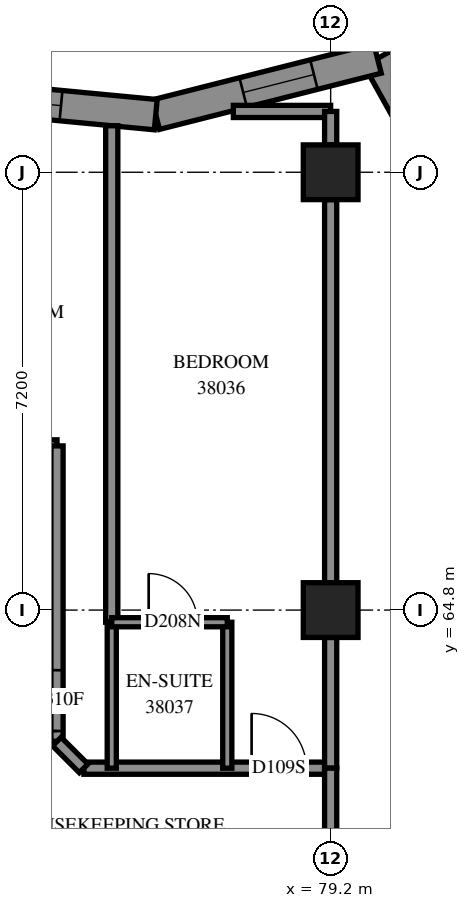
"""IFC4 building model, lengths in metres.
Left out: names, types, materials, properties, quantities, classifications, styles, units other than length and angle.
Written with IfcOpenShell. Run it as: python <this file> out.ifc"""

import sys

from ifc_helpers import new_model, si_unit, direction, frame, frame_2d, origin, origin_2d, place, context, subcontext, project, spatial, polyline, rectangle, outline, extrude, element, fill, save


model = new_model("IFC4")
c1 = context("Model", 3, precision=1e-05, world=origin(), true_north=direction((0.0, 1.0)))
c2 = subcontext(c1, "Body", "Model", "MODEL_VIEW")
j1 = project(units=[si_unit("LENGTHUNIT", "METRE"), si_unit("PLANEANGLEUNIT", "RADIAN")], contexts=[c1])
p1 = place(None, origin())
s1 = spatial("IfcSite", under=j1, at=p1, CompositionType="ELEMENT")
p2 = place(p1, origin())
s2 = spatial("IfcBuilding", under=s1, at=p2, CompositionType="ELEMENT")
p3 = place(p2, frame((0.0, 0.0, 142.2)))
s3 = spatial("IfcBuildingStorey", under=s2, at=p3, CompositionType="ELEMENT", Elevation=142.2)
for number, where, z_axis, x_axis in (
    (1, (79.2, 64.8, 0.0), (0.0, 0.0, 1.0), (1.0, 0.0, 0.0)),
    (2, (79.2, 72.0, 0.0), (0.0, 0.0, 1.0), (1.0, 0.0, 0.0)),
):
    element("IfcColumn", number, at=place(p3, frame(where, z_axis=z_axis, x_axis=x_axis)), inside=s3, PredefinedType="COLUMN", context=c2, shape_type="SweptSolid", body=[
        extrude(rectangle(XDim=0.9, YDim=0.9, at=origin_2d()), origin(), (0.0, 0.0, 1.0), 3.1),
    ])
p4 = place(p3, frame((81.607, 70.931, 0.0), z_axis=(0.0, 0.0, 1.0), x_axis=(-0.4864047305, 0.8737336197, 0.0)))
e3 = element("IfcWall", 3, at=p4, inside=s3, PredefinedType="SOLIDWALL", context=c2, shape_type="SweptSolid", body=[
    extrude(outline(polyline([(0.049, -0.25), (3.557, -0.25), (3.173, 0.25), (-0.049, 0.25), (0.049, -0.25)])), origin(), (0.0, 0.0, 1.0), 3.1),
])
p5 = place(p4, frame((0.778, 0.0, 0.45)))
e4 = element("IfcOpeningElement", 4, at=p5, cuts=e3, PredefinedType="OPENING", context=c2, shape_type="SweptSolid", body=[
    extrude(rectangle(XDim=1.2, YDim=2.5, at=frame_2d((0.6, 1.25))), frame((0.0, 0.26, 0.0), z_axis=(0.0, -1.0, 0.0), x_axis=(1.0, 0.0, 0.0)), (0.0, 0.0, 1.0), 0.52),
])
p6 = place(p3, frame((79.97, 73.871, 0.0), z_axis=(0.0, 0.0, 1.0), x_axis=(-0.9693397955, -0.2457241559, 0.0)))
e5 = element("IfcWall", 5, at=p6, inside=s3, PredefinedType="SOLIDWALL", context=c2, shape_type="SweptSolid", body=[
    extrude(outline(polyline([(-0.192, -0.25), (3.719, -0.25), (3.805, 0.25), (0.192, 0.25), (-0.192, -0.25)])), origin(), (0.0, 0.0, 1.0), 3.1),
])
p7 = place(p6, frame((1.078, 0.0, 0.45)))
e6 = element("IfcOpeningElement", 6, at=p7, cuts=e5, PredefinedType="OPENING", context=c2, shape_type="SweptSolid", body=[
    extrude(rectangle(XDim=1.2, YDim=2.5, at=frame_2d((0.6, 1.25))), frame((0.0, 0.26, 0.0), z_axis=(0.0, -1.0, 0.0), x_axis=(1.0, 0.0, 0.0)), (0.0, 0.0, 1.0), 0.52),
])
p8 = place(p3, frame((76.324, 72.947, 0.0), z_axis=(0.0, 0.0, 1.0), x_axis=(-0.99549559, 0.0948078598, 0.0)))
e7 = element("IfcWall", 7, at=p8, inside=s3, PredefinedType="SOLIDWALL", context=c2, shape_type="SweptSolid", body=[
    extrude(outline(polyline([(0.043, -0.25), (3.852, -0.25), (3.804, 0.25), (-0.043, 0.25), (0.043, -0.25)])), origin(), (0.0, 0.0, 1.0), 3.1),
])
p9 = place(p8, frame((1.565, 0.0, 0.45)))
e8 = element("IfcOpeningElement", 8, at=p9, cuts=e7, PredefinedType="OPENING", context=c2, shape_type="SweptSolid", body=[
    extrude(rectangle(XDim=1.2, YDim=2.5, at=frame_2d((0.6, 1.25))), frame((0.0, 0.26, 0.0), z_axis=(0.0, -1.0, 0.0), x_axis=(1.0, 0.0, 0.0)), (0.0, 0.0, 1.0), 0.52),
])
p10 = place(p3, frame((54.9, 67.5, 0.0), z_axis=(0.0, 0.0, 1.0), x_axis=(1.0, 0.0, 0.0)))
e9 = element("IfcWall", 9, at=p10, inside=s3, PredefinedType="PARTITIONING", context=c2, shape_type="SweptSolid", body=[
    extrude(rectangle(XDim=19.8, YDim=0.2, at=frame_2d((9.9, 0.0))), origin(), (0.0, 0.0, 1.0), 3.1),
])
p11 = place(p10, frame((6.586, 0.0, 0.0)))
e10 = element("IfcOpeningElement", 10, at=p11, cuts=e9, PredefinedType="OPENING", context=c2, shape_type="SweptSolid", body=[
    extrude(rectangle(XDim=1.0, YDim=2.1, at=frame_2d((0.5, 1.05))), frame((0.0, 0.11, 0.0), z_axis=(0.0, -1.0, 0.0), x_axis=(1.0, 0.0, 0.0)), (0.0, 0.0, 1.0), 0.22),
])
p12 = place(p10, frame((14.089, 0.0, 0.0)))
e11 = element("IfcOpeningElement", 11, at=p12, cuts=e9, PredefinedType="OPENING", context=c2, shape_type="SweptSolid", body=[
    extrude(rectangle(XDim=1.0, YDim=2.1, at=frame_2d((0.5, 1.05))), frame((0.0, 0.11, 0.0), z_axis=(0.0, -1.0, 0.0), x_axis=(1.0, 0.0, 0.0)), (0.0, 0.0, 1.0), 0.22),
])
p13 = place(p3, frame((75.6, 64.6, 0.0), z_axis=(0.0, 0.0, 1.0), x_axis=(0.0, 1.0, 0.0)))
e12 = element("IfcWall", 12, at=p13, inside=s3, PredefinedType="PARTITIONING", context=c2, shape_type="SweptSolid", body=[
    extrude(rectangle(XDim=8.165, YDim=0.2, at=frame_2d((4.082, 0.0))), origin(), (0.0, 0.0, 1.0), 3.1),
])
p14 = place(p3, frame((79.2, 65.25, 0.0), z_axis=(0.0, 0.0, 1.0), x_axis=(0.0, 1.0, 0.0)))
e13 = element("IfcWall", 13, at=p14, inside=s3, PredefinedType="PARTITIONING", context=c2, shape_type="SweptSolid", body=[
    extrude(rectangle(XDim=6.3, YDim=0.2, at=frame_2d((3.15, 0.0))), origin(), (0.0, 0.0, 1.0), 3.1),
])
p15 = place(p3, frame((74.7, 62.642, 0.0), z_axis=(0.0, 0.0, 1.0), x_axis=(0.0, 1.0, 0.0)))
e14 = element("IfcWall", 14, at=p15, inside=s3, PredefinedType="PARTITIONING", context=c2, shape_type="SweptSolid", body=[
    extrude(rectangle(XDim=4.858, YDim=0.2, at=frame_2d((2.429, 0.0))), origin(), (0.0, 0.0, 1.0), 3.1),
])
p16 = place(p15, frame((0.169, 0.0, 0.0)))
e15 = element("IfcOpeningElement", 15, at=p16, cuts=e14, PredefinedType="OPENING", context=c2, shape_type="SweptSolid", body=[
    extrude(rectangle(XDim=1.0, YDim=2.1, at=frame_2d((0.5, 1.05))), frame((0.0, 0.11, 0.0), z_axis=(0.0, -1.0, 0.0), x_axis=(1.0, 0.0, 0.0)), (0.0, 0.0, 1.0), 0.22),
])
p17 = place(p3, frame((75.142, 62.2, 0.0), z_axis=(0.0, 0.0, 1.0), x_axis=(1.0, 0.0, 0.0)))
e16 = element("IfcWall", 16, at=p17, inside=s3, PredefinedType="PARTITIONING", context=c2, shape_type="SweptSolid", body=[
    extrude(rectangle(XDim=4.058, YDim=0.2, at=frame_2d((2.029, 0.0))), origin(), (0.0, 0.0, 1.0), 3.1),
])
p18 = place(p17, frame((2.758, 0.0, 0.0)))
e17 = element("IfcOpeningElement", 17, at=p18, cuts=e16, PredefinedType="OPENING", context=c2, shape_type="SweptSolid", body=[
    extrude(rectangle(XDim=0.9, YDim=2.1, at=frame_2d((0.45, 1.05))), frame((0.0, 0.11, 0.0), z_axis=(0.0, -1.0, 0.0), x_axis=(1.0, 0.0, 0.0)), (0.0, 0.0, 1.0), 0.22),
])
for number, where, z_axis, x_axis in (
    (18, (75.6, 62.2, 0.0), (0.0, 0.0, 1.0), (0.0, 1.0, 0.0)),
    (19, (77.5, 62.2, 0.0), (0.0, 0.0, 1.0), (0.0, 1.0, 0.0)),
):
    element("IfcWall", number, at=place(p3, frame(where, z_axis=z_axis, x_axis=x_axis)), inside=s3, PredefinedType="PARTITIONING", context=c2, shape_type="SweptSolid", body=[
        extrude(rectangle(XDim=2.4, YDim=0.15, at=frame_2d((1.2, 0.0))), origin(), (0.0, 0.0, 1.0), 3.1),
    ])
p19 = place(p3, frame((79.2, 62.2, 0.0), z_axis=(0.0, 0.0, 1.0), x_axis=(0.0, 1.0, 0.0)))
e20 = element("IfcWall", 20, at=p19, inside=s3, PredefinedType="PARTITIONING", context=c2, shape_type="SweptSolid", body=[
    extrude(rectangle(XDim=2.15, YDim=0.2, at=frame_2d((1.075, 0.0))), origin(), (0.0, 0.0, 1.0), 3.1),
])
p20 = place(p3, frame((79.2, 60.2, 0.0), z_axis=(0.0, 0.0, 1.0), x_axis=(0.0, 1.0, 0.0)))
e21 = element("IfcWall", 21, at=p20, inside=s3, PredefinedType="PARTITIONING", context=c2, shape_type="SweptSolid", body=[
    extrude(rectangle(XDim=2.0, YDim=0.2, at=frame_2d((1.0, 0.0))), origin(), (0.0, 0.0, 1.0), 3.1),
])
p21 = place(p3, frame((75.6, 64.6, 0.0), z_axis=(0.0, 0.0, 1.0), x_axis=(1.0, 0.0, 0.0)))
e22 = element("IfcWall", 22, at=p21, inside=s3, PredefinedType="PARTITIONING", context=c2, shape_type="SweptSolid", body=[
    extrude(rectangle(XDim=1.9, YDim=0.15, at=frame_2d((0.95, 0.0))), origin(), (0.0, 0.0, 1.0), 3.1),
])
p22 = place(p21, frame((0.607, 0.0, 0.0)))
e23 = element("IfcOpeningElement", 23, at=p22, cuts=e22, PredefinedType="OPENING", context=c2, shape_type="SweptSolid", body=[
    extrude(rectangle(XDim=0.8, YDim=2.1, at=frame_2d((0.4, 1.05))), frame((0.0, 0.085, 0.0), z_axis=(0.0, -1.0, 0.0), x_axis=(1.0, 0.0, 0.0)), (0.0, 0.0, 1.0), 0.17),
])
p23 = place(p3, frame((77.6, 73.0, 0.0), z_axis=(0.0, 0.0, 1.0), x_axis=(1.0, 0.0, 0.0)))
e24 = element("IfcWall", 24, at=p23, inside=s3, PredefinedType="PARTITIONING", context=c2, shape_type="SweptSolid", body=[
    extrude(rectangle(XDim=1.6, YDim=0.2, at=frame_2d((0.8, 0.0))), origin(), (0.0, 0.0, 1.0), 3.1),
])
p24 = place(p3, frame((74.697, 62.637, 0.0), z_axis=(0.0, 0.0, 1.0), x_axis=(0.7071067812, -0.7071067812, 0.0)))
e25 = element("IfcWall", 25, at=p24, inside=s3, PredefinedType="PARTITIONING", context=c2, shape_type="SweptSolid", body=[
    extrude(rectangle(XDim=0.622, YDim=0.2, at=frame_2d((0.311, 0.0))), origin(), (0.0, 0.0, 1.0), 3.1),
])
p25 = place(p3, frame((79.2, 72.45, 0.0), z_axis=(0.0, 0.0, 1.0), x_axis=(0.0, 1.0, 0.0)))
e26 = element("IfcWall", 26, at=p25, inside=s3, PredefinedType="PARTITIONING", context=c2, shape_type="SweptSolid", body=[
    extrude(rectangle(XDim=0.55, YDim=0.2, at=frame_2d((0.275, 0.0))), origin(), (0.0, 0.0, 1.0), 3.1),
])
p26 = place(p7, origin())
e27 = element("IfcWindow", 27, at=p26, inside=s3, PartitioningType="SINGLE_PANEL", PredefinedType="WINDOW", context=c2, shape_type="SweptSolid", body=[
    extrude(rectangle(XDim=1.2, YDim=2.5, at=frame_2d((0.6, 1.25))), frame((0.0, 0.18, 0.0), z_axis=(0.0, -1.0, 0.0), x_axis=(1.0, 0.0, 0.0)), (0.0, 0.0, 1.0), 0.06),
])
fill(e6, e27)
p27 = place(p9, origin())
e28 = element("IfcWindow", 28, at=p27, inside=s3, PartitioningType="SINGLE_PANEL", PredefinedType="WINDOW", context=c2, shape_type="SweptSolid", body=[
    extrude(rectangle(XDim=1.2, YDim=2.5, at=frame_2d((0.6, 1.25))), frame((0.0, 0.18, 0.0), z_axis=(0.0, -1.0, 0.0), x_axis=(1.0, 0.0, 0.0)), (0.0, 0.0, 1.0), 0.06),
])
fill(e8, e28)
p28 = place(p16, origin())
e29 = element("IfcDoor", 29, at=p28, inside=s3, OperationType="SINGLE_SWING_RIGHT", PredefinedType="DOOR", context=c2, shape_type="SweptSolid", body=[
    extrude(rectangle(XDim=1.0, YDim=2.1, at=frame_2d((0.5, 1.05))), frame((0.0, 0.025, 0.0), z_axis=(0.0, -1.0, 0.0), x_axis=(1.0, 0.0, 0.0)), (0.0, 0.0, 1.0), 0.05),
])
fill(e15, e29)
p29 = place(p18, origin())
e30 = element("IfcDoor", 30, at=p29, inside=s3, OperationType="SINGLE_SWING_LEFT", PredefinedType="DOOR", context=c2, shape_type="SweptSolid", body=[
    extrude(rectangle(XDim=0.9, YDim=2.1, at=frame_2d((0.45, 1.05))), frame((0.0, 0.025, 0.0), z_axis=(0.0, -1.0, 0.0), x_axis=(1.0, 0.0, 0.0)), (0.0, 0.0, 1.0), 0.05),
])
fill(e17, e30)
p30 = place(p22, origin())
e31 = element("IfcDoor", 31, at=p30, inside=s3, OperationType="SINGLE_SWING_RIGHT", PredefinedType="DOOR", context=c2, shape_type="SweptSolid", body=[
    extrude(rectangle(XDim=0.8, YDim=2.1, at=frame_2d((0.4, 1.05))), frame((0.0, 0.025, 0.0), z_axis=(0.0, -1.0, 0.0), x_axis=(1.0, 0.0, 0.0)), (0.0, 0.0, 1.0), 0.05),
])
fill(e23, e31)
save(model, sys.argv[1])
